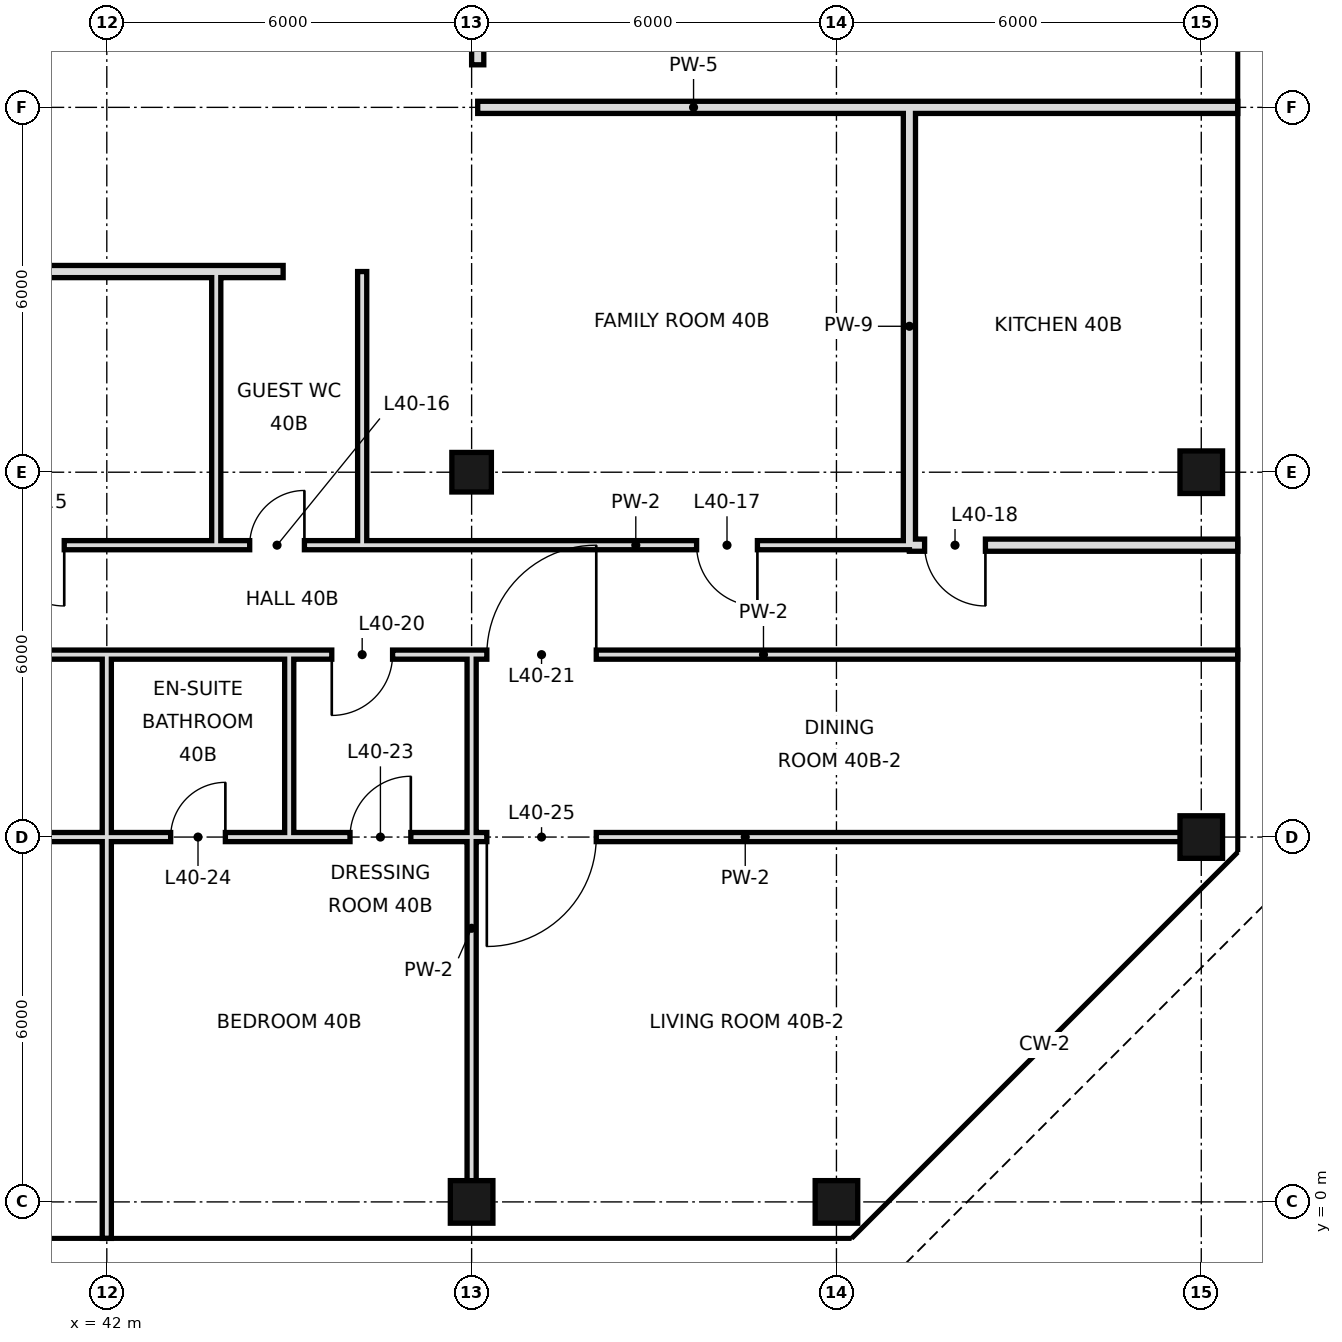
"""IFC4 building model, lengths in metres.
Left out: names, types, materials, properties, quantities, classifications, styles, units other than length and angle.
Written with IfcOpenShell. Run it as: python <this file> out.ifc"""

import sys

from ifc_helpers import new_model, si_unit, direction, frame, frame_2d, origin, origin_2d, place, context, subcontext, project, spatial, rectangle, hollow_rectangle, extrude, element, fill, save


model = new_model("IFC4")
c1 = context("Model", 3, precision=1e-05, world=origin(), true_north=direction((0.0, 1.0)))
c2 = subcontext(c1, "Body", "Model", "MODEL_VIEW")
j1 = project(units=[si_unit("LENGTHUNIT", "METRE"), si_unit("PLANEANGLEUNIT", "RADIAN")], contexts=[c1])
p1 = place(None, origin())
s1 = spatial("IfcSite", under=j1, at=p1, CompositionType="ELEMENT")
p2 = place(p1, origin())
s2 = spatial("IfcBuilding", under=s1, at=p2, CompositionType="ELEMENT")
p3 = place(p2, frame((0.0, 0.0, 174.4)))
s3 = spatial("IfcBuildingStorey", under=s2, at=p3, CompositionType="ELEMENT", Elevation=174.4)
p4 = place(p3, frame((48.0, 0.0, 0.0), z_axis=(0.0, 0.0, 1.0), x_axis=(1.0, 0.0, 0.0)))
e1 = element("IfcColumn", 1, at=p4, inside=s3, PredefinedType="COLUMN", context=c2, shape_type="SweptSolid", body=[
    extrude(hollow_rectangle(XDim=0.7, YDim=0.7, WallThickness=0.036, at=origin_2d()), origin(), (0.0, 0.0, 1.0), 3.6),
])
p5 = place(p3, frame((48.0, 12.0, 0.0), z_axis=(0.0, 0.0, 1.0), x_axis=(1.0, 0.0, 0.0)))
e2 = element("IfcColumn", 2, at=p5, inside=s3, PredefinedType="COLUMN", context=c2, shape_type="SweptSolid", body=[
    extrude(hollow_rectangle(XDim=0.65, YDim=0.65, WallThickness=0.032, at=origin_2d()), origin(), (0.0, 0.0, 1.0), 3.6),
])
for number, where, z_axis, x_axis in (
    (3, (54.0, 0.0, 0.0), (0.0, 0.0, 1.0), (1.0, 0.0, 0.0)),
    (4, (60.0, 6.0, 0.0), (0.0, 0.0, 1.0), (1.0, 0.0, 0.0)),
    (5, (60.0, 12.0, 0.0), (0.0, 0.0, 1.0), (1.0, 0.0, 0.0)),
):
    element("IfcColumn", number, at=place(p3, frame(where, z_axis=z_axis, x_axis=x_axis)), inside=s3, PredefinedType="COLUMN", context=c2, shape_type="SweptSolid", body=[
        extrude(hollow_rectangle(XDim=0.7, YDim=0.7, WallThickness=0.036, at=origin_2d()), origin(), (0.0, 0.0, 1.0), 3.6),
    ])
p6 = place(p3, frame((42.0, -0.6, 0.0), z_axis=(0.0, 0.0, 1.0), x_axis=(0.0, 1.0, 0.0)))
e6 = element("IfcWall", 6, at=p6, inside=s3, PredefinedType="PARTITIONING", context=c2, shape_type="SweptSolid", body=[
    extrude(rectangle(XDim=6.6, YDim=0.15, at=frame_2d((3.3, 0.0))), origin(), (0.0, 0.0, 1.0), 2.72),
])
p7 = place(p3, frame((42.0, 6.0, 0.0), z_axis=(0.0, 0.0, 1.0), x_axis=(0.0, 1.0, 0.0)))
e7 = element("IfcWall", 7, at=p7, inside=s3, PredefinedType="PARTITIONING", context=c2, shape_type="SweptSolid", body=[
    extrude(rectangle(XDim=3.0, YDim=0.15, at=frame_2d((1.5, 0.0))), origin(), (0.0, 0.0, 1.0), 2.72),
])
p8 = place(p3, frame((43.8, 10.8, 0.0), z_axis=(0.0, 0.0, 1.0), x_axis=(0.0, 1.0, 0.0)))
e8 = element("IfcWall", 8, at=p8, inside=s3, PredefinedType="PARTITIONING", context=c2, shape_type="SweptSolid", body=[
    extrude(rectangle(XDim=4.5, YDim=0.15, at=frame_2d((2.25, 0.0))), origin(), (0.0, 0.0, 1.0), 3.42),
])
p9 = place(p3, frame((45.0, 6.0, 0.0), z_axis=(0.0, 0.0, 1.0), x_axis=(0.0, 1.0, 0.0)))
e9 = element("IfcWall", 9, at=p9, inside=s3, PredefinedType="PARTITIONING", context=c2, shape_type="SweptSolid", body=[
    extrude(rectangle(XDim=3.0, YDim=0.15, at=frame_2d((1.5, 0.0))), origin(), (0.0, 0.0, 1.0), 3.42),
])
p10 = place(p3, frame((46.2, 10.8, 0.0), z_axis=(0.0, 0.0, 1.0), x_axis=(0.0, 1.0, 0.0)))
e10 = element("IfcWall", 10, at=p10, inside=s3, PredefinedType="PARTITIONING", context=c2, shape_type="SweptSolid", body=[
    extrude(rectangle(XDim=4.5, YDim=0.15, at=frame_2d((2.25, 0.0))), origin(), (0.0, 0.0, 1.0), 3.42),
])
p11 = place(p3, frame((48.0, 0.0, 0.0), z_axis=(0.0, 0.0, 1.0), x_axis=(0.0, 1.0, 0.0)))
e11 = element("IfcWall", 11, at=p11, inside=s3, PredefinedType="PARTITIONING", context=c2, shape_type="SweptSolid", body=[
    extrude(rectangle(XDim=9.0, YDim=0.15, at=frame_2d((4.5, 0.0))), origin(), (0.0, 0.0, 1.0), 2.72),
])
p12 = place(p3, frame((48.1, 18.7, 0.0), z_axis=(0.0, 0.0, 1.0), x_axis=(0.0, 1.0, 0.0)))
e12 = element("IfcWall", 12, at=p12, inside=s3, PredefinedType="SOLIDWALL", context=c2, shape_type="SweptSolid", body=[
    extrude(rectangle(XDim=29.3, YDim=0.2, at=frame_2d((14.65, 0.0))), origin(), (0.0, 0.0, 1.0), 2.72),
])
p13 = place(p12, frame((14.05, 0.0, 0.0)))
e13 = element("IfcOpeningElement", 13, at=p13, cuts=e12, PredefinedType="OPENING", context=c2, shape_type="SweptSolid", body=[
    extrude(rectangle(XDim=1.2, YDim=2.4, at=frame_2d((0.6, 1.2))), frame((0.0, 0.11, 0.0), z_axis=(0.0, -1.0, 0.0), x_axis=(1.0, 0.0, 0.0)), (0.0, 0.0, 1.0), 0.22),
])
p14 = place(p3, frame((55.2, 10.8, 0.0), z_axis=(0.0, 0.0, 1.0), x_axis=(0.0, 1.0, 0.0)))
e14 = element("IfcWall", 14, at=p14, inside=s3, PredefinedType="SOLIDWALL", context=c2, shape_type="SweptSolid", body=[
    extrude(rectangle(XDim=7.2, YDim=0.2, at=frame_2d((3.6, 0.0))), origin(), (0.0, 0.0, 1.0), 2.72),
])
p15 = place(p3, frame((55.2, 10.8, 0.0), z_axis=(0.0, 0.0, 1.0), x_axis=(1.0, 0.0, 0.0)))
e15 = element("IfcWall", 15, at=p15, inside=s3, PredefinedType="SOLIDWALL", context=c2, shape_type="SweptSolid", body=[
    extrude(rectangle(XDim=5.4, YDim=0.2, at=frame_2d((2.7, 0.0))), origin(), (0.0, 0.0, 1.0), 2.97),
])
p16 = place(p15, frame((0.25, 0.0, 0.0)))
e16 = element("IfcOpeningElement", 16, at=p16, cuts=e15, PredefinedType="OPENING", context=c2, shape_type="SweptSolid", body=[
    extrude(rectangle(XDim=1.0, YDim=2.4, at=frame_2d((0.5, 1.2))), frame((0.0, 0.11, 0.0), z_axis=(0.0, -1.0, 0.0), x_axis=(1.0, 0.0, 0.0)), (0.0, 0.0, 1.0), 0.22),
])
p17 = place(p3, frame((24.0, 10.8, 0.0), z_axis=(0.0, 0.0, 1.0), x_axis=(1.0, 0.0, 0.0)))
e17 = element("IfcWall", 17, at=p17, inside=s3, PredefinedType="PARTITIONING", context=c2, shape_type="SweptSolid", body=[
    extrude(rectangle(XDim=19.8, YDim=0.15, at=frame_2d((9.9, 0.0))), origin(), (0.0, 0.0, 1.0), 3.42),
])
p18 = place(p17, frame((2.5, 0.0, 0.0)))
e18 = element("IfcOpeningElement", 18, at=p18, cuts=e17, PredefinedType="OPENING", context=c2, shape_type="SweptSolid", body=[
    extrude(rectangle(XDim=1.0, YDim=2.4, at=frame_2d((0.5, 1.2))), frame((0.0, 0.085, 0.0), z_axis=(0.0, -1.0, 0.0), x_axis=(1.0, 0.0, 0.0)), (0.0, 0.0, 1.0), 0.17),
])
p19 = place(p17, frame((8.56, 0.0, 0.0)))
e19 = element("IfcOpeningElement", 19, at=p19, cuts=e17, PredefinedType="OPENING", context=c2, shape_type="SweptSolid", body=[
    extrude(rectangle(XDim=1.0, YDim=2.4, at=frame_2d((0.5, 1.2))), frame((0.0, 0.085, 0.0), z_axis=(0.0, -1.0, 0.0), x_axis=(1.0, 0.0, 0.0)), (0.0, 0.0, 1.0), 0.17),
])
p20 = place(p17, frame((16.3, 0.0, 0.0)))
e20 = element("IfcOpeningElement", 20, at=p20, cuts=e17, PredefinedType="OPENING", context=c2, shape_type="SweptSolid", body=[
    extrude(rectangle(XDim=1.0, YDim=2.4, at=frame_2d((0.5, 1.2))), frame((0.0, 0.085, 0.0), z_axis=(0.0, -1.0, 0.0), x_axis=(1.0, 0.0, 0.0)), (0.0, 0.0, 1.0), 0.17),
])
p21 = place(p3, frame((46.2, 10.8, 0.0), z_axis=(0.0, 0.0, 1.0), x_axis=(1.0, 0.0, 0.0)))
e21 = element("IfcWall", 21, at=p21, inside=s3, PredefinedType="PARTITIONING", context=c2, shape_type="SweptSolid", body=[
    extrude(rectangle(XDim=9.0, YDim=0.15, at=frame_2d((4.5, 0.0))), origin(), (0.0, 0.0, 1.0), 3.42),
])
p22 = place(p21, frame((5.5, 0.0, 0.0)))
e22 = element("IfcOpeningElement", 22, at=p22, cuts=e21, PredefinedType="OPENING", context=c2, shape_type="SweptSolid", body=[
    extrude(rectangle(XDim=1.0, YDim=2.4, at=frame_2d((0.5, 1.2))), frame((0.0, 0.085, 0.0), z_axis=(0.0, -1.0, 0.0), x_axis=(1.0, 0.0, 0.0)), (0.0, 0.0, 1.0), 0.17),
])
p23 = place(p3, frame((43.8, 10.8, 0.0), z_axis=(0.0, 0.0, 1.0), x_axis=(1.0, 0.0, 0.0)))
e23 = element("IfcWall", 23, at=p23, inside=s3, PredefinedType="PARTITIONING", context=c2, shape_type="SweptSolid", body=[
    extrude(rectangle(XDim=2.4, YDim=0.15, at=frame_2d((1.2, 0.0))), origin(), (0.0, 0.0, 1.0), 3.42),
])
p24 = place(p23, frame((0.55, 0.0, 0.0)))
e24 = element("IfcOpeningElement", 24, at=p24, cuts=e23, PredefinedType="OPENING", context=c2, shape_type="SweptSolid", body=[
    extrude(rectangle(XDim=0.9, YDim=2.4, at=frame_2d((0.45, 1.2))), frame((0.0, 0.085, 0.0), z_axis=(0.0, -1.0, 0.0), x_axis=(1.0, 0.0, 0.0)), (0.0, 0.0, 1.0), 0.17),
])
p25 = place(p3, frame((24.0, 15.3, 0.0), z_axis=(0.0, 0.0, 1.0), x_axis=(1.0, 0.0, 0.0)))
e25 = element("IfcWall", 25, at=p25, inside=s3, PredefinedType="SOLIDWALL", context=c2, shape_type="SweptSolid", body=[
    extrude(rectangle(XDim=20.9, YDim=0.2, at=frame_2d((10.45, 0.0))), origin(), (0.0, 0.0, 1.0), 2.72),
])
p26 = place(p25, frame((3.26, 0.0, 0.0)))
e26 = element("IfcOpeningElement", 26, at=p26, cuts=e25, PredefinedType="OPENING", context=c2, shape_type="SweptSolid", body=[
    extrude(rectangle(XDim=1.2, YDim=2.4, at=frame_2d((0.6, 1.2))), frame((0.0, 0.11, 0.0), z_axis=(0.0, -1.0, 0.0), x_axis=(1.0, 0.0, 0.0)), (0.0, 0.0, 1.0), 0.22),
])
p27 = place(p25, frame((7.18, 0.0, 0.0)))
e27 = element("IfcOpeningElement", 27, at=p27, cuts=e25, PredefinedType="OPENING", context=c2, shape_type="SweptSolid", body=[
    extrude(rectangle(XDim=1.2, YDim=2.4, at=frame_2d((0.6, 1.2))), frame((0.0, 0.11, 0.0), z_axis=(0.0, -1.0, 0.0), x_axis=(1.0, 0.0, 0.0)), (0.0, 0.0, 1.0), 0.22),
])
p28 = place(p3, frame((48.1, 18.0, 0.0), z_axis=(0.0, 0.0, 1.0), x_axis=(1.0, 0.0, 0.0)))
e28 = element("IfcWall", 28, at=p28, inside=s3, PredefinedType="SOLIDWALL", context=c2, shape_type="SweptSolid", body=[
    extrude(rectangle(XDim=7.1, YDim=0.2, at=frame_2d((3.55, 0.0))), origin(), (0.0, 0.0, 1.0), 2.72),
])
p29 = place(p3, frame((55.2, 18.0, 0.0), z_axis=(0.0, 0.0, 1.0), x_axis=(1.0, 0.0, 0.0)))
e29 = element("IfcWall", 29, at=p29, inside=s3, PredefinedType="SOLIDWALL", context=c2, shape_type="SweptSolid", body=[
    extrude(rectangle(XDim=5.4, YDim=0.2, at=frame_2d((2.7, 0.0))), origin(), (0.0, 0.0, 1.0), 2.72),
])
p30 = place(p3, frame((27.0, 6.0, 0.0), z_axis=(0.0, 0.0, 1.0), x_axis=(1.0, 0.0, 0.0)))
e30 = element("IfcWall", 30, at=p30, inside=s3, PredefinedType="PARTITIONING", context=c2, shape_type="SweptSolid", body=[
    extrude(rectangle(XDim=15.0, YDim=0.15, at=frame_2d((7.5, 0.0))), origin(), (0.0, 0.0, 1.0), 2.97),
])
p31 = place(p30, frame((1.3, 0.0, 0.0)))
e31 = element("IfcOpeningElement", 31, at=p31, cuts=e30, PredefinedType="OPENING", context=c2, shape_type="SweptSolid", body=[
    extrude(rectangle(XDim=1.0, YDim=2.4, at=frame_2d((0.5, 1.2))), frame((0.0, 0.085, 0.0), z_axis=(0.0, -1.0, 0.0), x_axis=(1.0, 0.0, 0.0)), (0.0, 0.0, 1.0), 0.17),
])
p32 = place(p30, frame((8.1, 0.0, 0.0)))
e32 = element("IfcOpeningElement", 32, at=p32, cuts=e30, PredefinedType="OPENING", context=c2, shape_type="SweptSolid", body=[
    extrude(rectangle(XDim=1.8, YDim=2.4, at=frame_2d((0.9, 1.2))), frame((0.0, 0.085, 0.0), z_axis=(0.0, -1.0, 0.0), x_axis=(1.0, 0.0, 0.0)), (0.0, 0.0, 1.0), 0.17),
])
p33 = place(p3, frame((45.0, 6.0, 0.0), z_axis=(0.0, 0.0, 1.0), x_axis=(1.0, 0.0, 0.0)))
e33 = element("IfcWall", 33, at=p33, inside=s3, PredefinedType="PARTITIONING", context=c2, shape_type="SweptSolid", body=[
    extrude(rectangle(XDim=15.0, YDim=0.15, at=frame_2d((7.5, 0.0))), origin(), (0.0, 0.0, 1.0), 2.72),
])
p34 = place(p33, frame((1.0, 0.0, 0.0)))
e34 = element("IfcOpeningElement", 34, at=p34, cuts=e33, PredefinedType="OPENING", context=c2, shape_type="SweptSolid", body=[
    extrude(rectangle(XDim=1.0, YDim=2.4, at=frame_2d((0.5, 1.2))), frame((0.0, 0.085, 0.0), z_axis=(0.0, -1.0, 0.0), x_axis=(1.0, 0.0, 0.0)), (0.0, 0.0, 1.0), 0.17),
])
p35 = place(p33, frame((3.25, 0.0, 0.0)))
e35 = element("IfcOpeningElement", 35, at=p35, cuts=e33, PredefinedType="OPENING", context=c2, shape_type="SweptSolid", body=[
    extrude(rectangle(XDim=1.8, YDim=2.4, at=frame_2d((0.9, 1.2))), frame((0.0, 0.085, 0.0), z_axis=(0.0, -1.0, 0.0), x_axis=(1.0, 0.0, 0.0)), (0.0, 0.0, 1.0), 0.17),
])
p36 = place(p3, frame((42.0, 6.0, 0.0), z_axis=(0.0, 0.0, 1.0), x_axis=(1.0, 0.0, 0.0)))
e36 = element("IfcWall", 36, at=p36, inside=s3, PredefinedType="PARTITIONING", context=c2, shape_type="SweptSolid", body=[
    extrude(rectangle(XDim=3.0, YDim=0.15, at=frame_2d((1.5, 0.0))), origin(), (0.0, 0.0, 1.0), 2.97),
])
p37 = place(p36, frame((1.05, 0.0, 0.0)))
e37 = element("IfcOpeningElement", 37, at=p37, cuts=e36, PredefinedType="OPENING", context=c2, shape_type="SweptSolid", body=[
    extrude(rectangle(XDim=0.9, YDim=2.4, at=frame_2d((0.45, 1.2))), frame((0.0, 0.085, 0.0), z_axis=(0.0, -1.0, 0.0), x_axis=(1.0, 0.0, 0.0)), (0.0, 0.0, 1.0), 0.17),
])
p38 = place(p3, frame((27.0, 9.0, 0.0), z_axis=(0.0, 0.0, 1.0), x_axis=(1.0, 0.0, 0.0)))
e38 = element("IfcWall", 38, at=p38, inside=s3, PredefinedType="PARTITIONING", context=c2, shape_type="SweptSolid", body=[
    extrude(rectangle(XDim=15.0, YDim=0.15, at=frame_2d((7.5, 0.0))), origin(), (0.0, 0.0, 1.0), 3.42),
])
p39 = place(p38, frame((1.0, 0.0, 0.0)))
e39 = element("IfcOpeningElement", 39, at=p39, cuts=e38, PredefinedType="OPENING", context=c2, shape_type="SweptSolid", body=[
    extrude(rectangle(XDim=1.0, YDim=2.4, at=frame_2d((0.5, 1.2))), frame((0.0, 0.085, 0.0), z_axis=(0.0, -1.0, 0.0), x_axis=(1.0, 0.0, 0.0)), (0.0, 0.0, 1.0), 0.17),
])
p40 = place(p38, frame((6.16, 0.0, 0.0)))
e40 = element("IfcOpeningElement", 40, at=p40, cuts=e38, PredefinedType="OPENING", context=c2, shape_type="SweptSolid", body=[
    extrude(rectangle(XDim=1.8, YDim=2.4, at=frame_2d((0.9, 1.2))), frame((0.0, 0.085, 0.0), z_axis=(0.0, -1.0, 0.0), x_axis=(1.0, 0.0, 0.0)), (0.0, 0.0, 1.0), 0.17),
])
p41 = place(p3, frame((45.0, 9.0, 0.0), z_axis=(0.0, 0.0, 1.0), x_axis=(1.0, 0.0, 0.0)))
e41 = element("IfcWall", 41, at=p41, inside=s3, PredefinedType="PARTITIONING", context=c2, shape_type="SweptSolid", body=[
    extrude(rectangle(XDim=15.6, YDim=0.15, at=frame_2d((7.8, 0.0))), origin(), (0.0, 0.0, 1.0), 3.42),
])
p42 = place(p41, frame((0.7, 0.0, 0.0)))
e42 = element("IfcOpeningElement", 42, at=p42, cuts=e41, PredefinedType="OPENING", context=c2, shape_type="SweptSolid", body=[
    extrude(rectangle(XDim=1.0, YDim=2.4, at=frame_2d((0.5, 1.2))), frame((0.0, 0.085, 0.0), z_axis=(0.0, -1.0, 0.0), x_axis=(1.0, 0.0, 0.0)), (0.0, 0.0, 1.0), 0.17),
])
p43 = place(p41, frame((3.25, 0.0, 0.0)))
e43 = element("IfcOpeningElement", 43, at=p43, cuts=e41, PredefinedType="OPENING", context=c2, shape_type="SweptSolid", body=[
    extrude(rectangle(XDim=1.8, YDim=2.4, at=frame_2d((0.9, 1.2))), frame((0.0, 0.085, 0.0), z_axis=(0.0, -1.0, 0.0), x_axis=(1.0, 0.0, 0.0)), (0.0, 0.0, 1.0), 0.17),
])
p44 = place(p3, frame((42.0, 9.0, 0.0), z_axis=(0.0, 0.0, 1.0), x_axis=(1.0, 0.0, 0.0)))
e44 = element("IfcWall", 44, at=p44, inside=s3, PredefinedType="PARTITIONING", context=c2, shape_type="SweptSolid", body=[
    extrude(rectangle(XDim=3.0, YDim=0.15, at=frame_2d((1.5, 0.0))), origin(), (0.0, 0.0, 1.0), 3.42),
])
p45 = place(p20, origin())
e45 = element("IfcDoor", 45, at=p45, inside=s3, OperationType="SINGLE_SWING_RIGHT", PredefinedType="DOOR", context=c2, shape_type="SweptSolid", body=[
    extrude(rectangle(XDim=1.0, YDim=2.4, at=frame_2d((0.5, 1.2))), frame((0.0, 0.025, 0.0), z_axis=(0.0, -1.0, 0.0), x_axis=(1.0, 0.0, 0.0)), (0.0, 0.0, 1.0), 0.05),
])
fill(e20, e45)
p46 = place(p24, frame((0.9, 0.0, 0.0), z_axis=(0.0, 0.0, 1.0), x_axis=(-1.0, 0.0, 0.0)))
e46 = element("IfcDoor", 46, at=p46, inside=s3, OperationType="SINGLE_SWING_LEFT", PredefinedType="DOOR", context=c2, shape_type="SweptSolid", body=[
    extrude(rectangle(XDim=0.9, YDim=2.4, at=frame_2d((0.45, 1.2))), frame((0.0, 0.025, 0.0), z_axis=(0.0, -1.0, 0.0), x_axis=(1.0, 0.0, 0.0)), (0.0, 0.0, 1.0), 0.05),
])
fill(e24, e46)
p47 = place(p22, origin())
e47 = element("IfcDoor", 47, at=p47, inside=s3, OperationType="SINGLE_SWING_RIGHT", PredefinedType="DOOR", context=c2, shape_type="SweptSolid", body=[
    extrude(rectangle(XDim=1.0, YDim=2.4, at=frame_2d((0.5, 1.2))), frame((0.0, 0.025, 0.0), z_axis=(0.0, -1.0, 0.0), x_axis=(1.0, 0.0, 0.0)), (0.0, 0.0, 1.0), 0.05),
])
fill(e22, e47)
p48 = place(p16, origin())
e48 = element("IfcDoor", 48, at=p48, inside=s3, OperationType="SINGLE_SWING_RIGHT", PredefinedType="DOOR", context=c2, shape_type="SweptSolid", body=[
    extrude(rectangle(XDim=1.0, YDim=2.4, at=frame_2d((0.5, 1.2))), frame((0.0, 0.025, 0.0), z_axis=(0.0, -1.0, 0.0), x_axis=(1.0, 0.0, 0.0)), (0.0, 0.0, 1.0), 0.05),
])
fill(e16, e48)
p49 = place(p42, frame((1.0, 0.0, 0.0), z_axis=(0.0, 0.0, 1.0), x_axis=(-1.0, 0.0, 0.0)))
e49 = element("IfcDoor", 49, at=p49, inside=s3, OperationType="SINGLE_SWING_RIGHT", PredefinedType="DOOR", context=c2, shape_type="SweptSolid", body=[
    extrude(rectangle(XDim=1.0, YDim=2.4, at=frame_2d((0.5, 1.2))), frame((0.0, 0.025, 0.0), z_axis=(0.0, -1.0, 0.0), x_axis=(1.0, 0.0, 0.0)), (0.0, 0.0, 1.0), 0.05),
])
fill(e42, e49)
p50 = place(p43, frame((1.8, 0.0, 0.0), z_axis=(0.0, 0.0, 1.0), x_axis=(-1.0, 0.0, 0.0)))
e50 = element("IfcDoor", 50, at=p50, inside=s3, OperationType="SINGLE_SWING_LEFT", PredefinedType="DOOR", context=c2, shape_type="SweptSolid", body=[
    extrude(rectangle(XDim=1.8, YDim=2.4, at=frame_2d((0.9, 1.2))), frame((0.0, 0.025, 0.0), z_axis=(0.0, -1.0, 0.0), x_axis=(1.0, 0.0, 0.0)), (0.0, 0.0, 1.0), 0.05),
])
fill(e43, e50)
p51 = place(p34, frame((1.0, 0.0, 0.0), z_axis=(0.0, 0.0, 1.0), x_axis=(-1.0, 0.0, 0.0)))
e51 = element("IfcDoor", 51, at=p51, inside=s3, OperationType="SINGLE_SWING_LEFT", PredefinedType="DOOR", context=c2, shape_type="SweptSolid", body=[
    extrude(rectangle(XDim=1.0, YDim=2.4, at=frame_2d((0.5, 1.2))), frame((0.0, 0.025, 0.0), z_axis=(0.0, -1.0, 0.0), x_axis=(1.0, 0.0, 0.0)), (0.0, 0.0, 1.0), 0.05),
])
fill(e34, e51)
p52 = place(p37, frame((0.9, 0.0, 0.0), z_axis=(0.0, 0.0, 1.0), x_axis=(-1.0, 0.0, 0.0)))
e52 = element("IfcDoor", 52, at=p52, inside=s3, OperationType="SINGLE_SWING_LEFT", PredefinedType="DOOR", context=c2, shape_type="SweptSolid", body=[
    extrude(rectangle(XDim=0.9, YDim=2.4, at=frame_2d((0.45, 1.2))), frame((0.0, 0.025, 0.0), z_axis=(0.0, -1.0, 0.0), x_axis=(1.0, 0.0, 0.0)), (0.0, 0.0, 1.0), 0.05),
])
fill(e37, e52)
p53 = place(p35, frame((1.8, 0.0, 0.0), z_axis=(0.0, 0.0, 1.0), x_axis=(-1.0, 0.0, 0.0)))
e53 = element("IfcDoor", 53, at=p53, inside=s3, OperationType="SINGLE_SWING_RIGHT", PredefinedType="DOOR", context=c2, shape_type="SweptSolid", body=[
    extrude(rectangle(XDim=1.8, YDim=2.4, at=frame_2d((0.9, 1.2))), frame((0.0, 0.025, 0.0), z_axis=(0.0, -1.0, 0.0), x_axis=(1.0, 0.0, 0.0)), (0.0, 0.0, 1.0), 0.05),
])
fill(e35, e53)
save(model, sys.argv[1])
